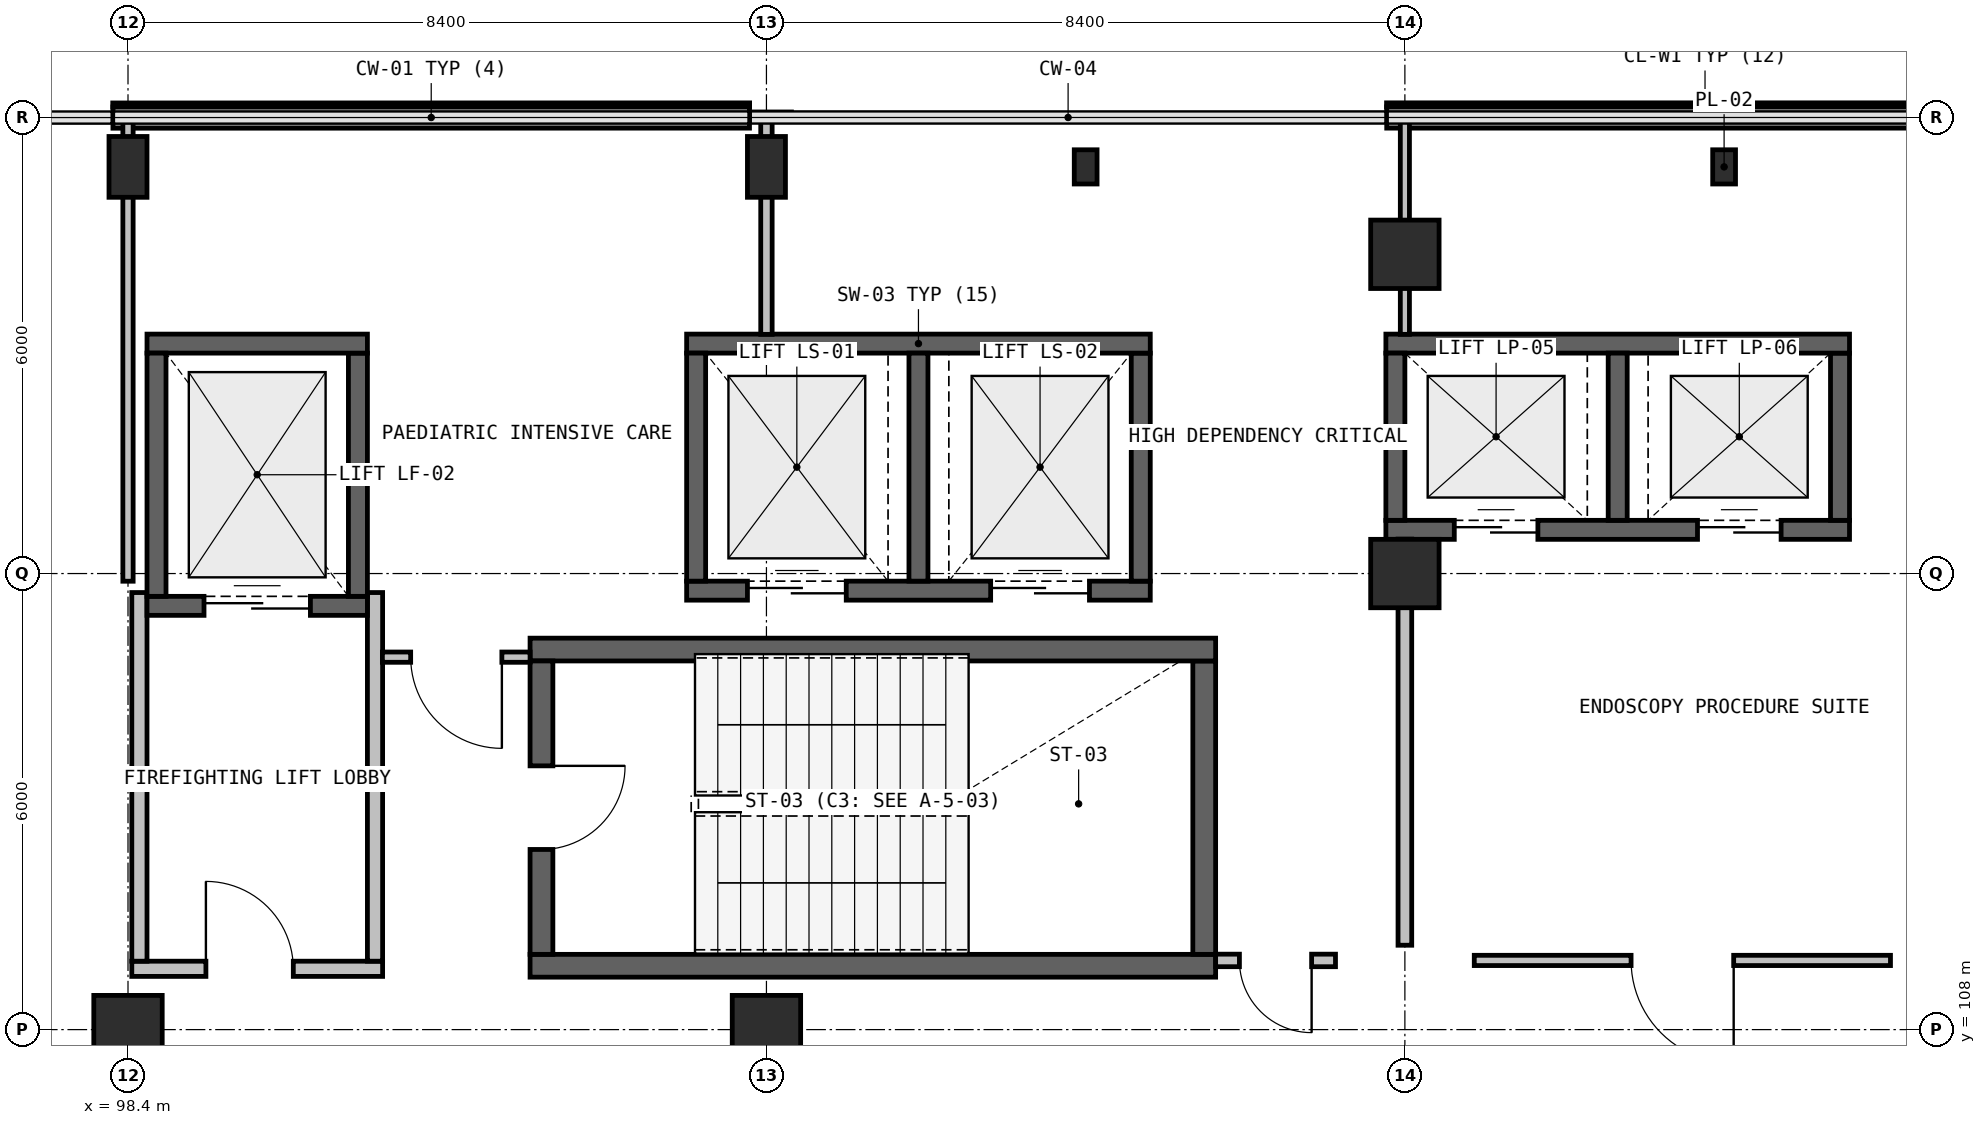
"""IFC4 building model, lengths in metres.
Left out: names, types, materials, properties, quantities, classifications, styles, units other than length and angle.
Written with IfcOpenShell. Run it as: python <this file> out.ifc"""

import sys

from ifc_helpers import new_model, si_unit, direction, frame, frame_2d, origin, origin_2d, place, context, subcontext, project, spatial, rectangle, extrude, element, fill, save


model = new_model("IFC4")
c1 = context("Model", 3, precision=1e-05, world=origin(), true_north=direction((0.0, 1.0)))
c2 = subcontext(c1, "Body", "Model", "MODEL_VIEW")
j1 = project(units=[si_unit("LENGTHUNIT", "METRE"), si_unit("PLANEANGLEUNIT", "RADIAN")], contexts=[c1])
p1 = place(None, origin())
s1 = spatial("IfcSite", under=j1, at=p1, CompositionType="ELEMENT")
p2 = place(p1, origin())
s2 = spatial("IfcBuilding", under=s1, at=p2, CompositionType="ELEMENT")
p3 = place(p2, frame((0.0, 0.0, 5.4)))
s3 = spatial("IfcBuildingStorey", under=s2, at=p3, CompositionType="ELEMENT", Elevation=5.4)
for number, where, z_axis, x_axis in (
    (1, (115.2, 118.2, 0.0), (0.0, 0.0, 1.0), (1.0, 0.0, 0.0)),
    (2, (98.4, 108.0, 0.0), (0.0, 0.0, 1.0), (1.0, 0.0, 0.0)),
):
    element("IfcColumn", number, at=place(p3, frame(where, z_axis=z_axis, x_axis=x_axis)), inside=s3, PredefinedType="COLUMN", context=c2, shape_type="SweptSolid", body=[
        extrude(rectangle(XDim=0.9, YDim=0.9, at=origin_2d()), origin(), (0.0, 0.0, 1.0), 4.8),
    ])
p4 = place(p3, frame((98.4, 119.35, 0.0), z_axis=(0.0, 0.0, 1.0), x_axis=(1.0, 0.0, 0.0)))
e3 = element("IfcColumn", 3, at=p4, inside=s3, PredefinedType="COLUMN", context=c2, shape_type="SweptSolid", body=[
    extrude(rectangle(XDim=0.5, YDim=0.8, at=origin_2d()), origin(), (0.0, 0.0, 1.0), 4.8),
])
p5 = place(p3, frame((106.8, 108.0, 0.0), z_axis=(0.0, 0.0, 1.0), x_axis=(1.0, 0.0, 0.0)))
e4 = element("IfcColumn", 4, at=p5, inside=s3, PredefinedType="COLUMN", context=c2, shape_type="SweptSolid", body=[
    extrude(rectangle(XDim=0.9, YDim=0.9, at=origin_2d()), origin(), (0.0, 0.0, 1.0), 4.8),
])
p6 = place(p3, frame((106.8, 119.35, 0.0), z_axis=(0.0, 0.0, 1.0), x_axis=(1.0, 0.0, 0.0)))
e5 = element("IfcColumn", 5, at=p6, inside=s3, PredefinedType="COLUMN", context=c2, shape_type="SweptSolid", body=[
    extrude(rectangle(XDim=0.5, YDim=0.8, at=origin_2d()), origin(), (0.0, 0.0, 1.0), 4.8),
])
p7 = place(p3, frame((115.2, 114.0, 0.0), z_axis=(0.0, 0.0, 1.0), x_axis=(1.0, 0.0, 0.0)))
e6 = element("IfcColumn", 6, at=p7, inside=s3, PredefinedType="COLUMN", context=c2, shape_type="SweptSolid", body=[
    extrude(rectangle(XDim=0.9, YDim=0.9, at=origin_2d()), origin(), (0.0, 0.0, 1.0), 4.8),
])
for number, where, z_axis, x_axis in (
    (7, (111.0, 119.35, 0.0), (0.0, 0.0, 1.0), (1.0, 0.0, 0.0)),
    (8, (119.4, 119.35, 0.0), (0.0, 0.0, 1.0), (1.0, 0.0, 0.0)),
):
    element("IfcColumn", number, at=place(p3, frame(where, z_axis=z_axis, x_axis=x_axis)), inside=s3, PredefinedType="PILASTER", context=c2, shape_type="SweptSolid", body=[
        extrude(rectangle(XDim=0.3, YDim=0.45, at=origin_2d()), origin(), (0.0, 0.0, 1.0), 4.445),
    ])
p8 = place(p3, frame((98.202, 119.999, 0.0), z_axis=(0.0, 0.0, 1.0), x_axis=(0.999999993202, 0.000116604477, 0.0)))
e9 = element("IfcWall", 9, at=p8, inside=s3, PredefinedType="SOLIDWALL", context=c2, shape_type="SweptSolid", body=[
    extrude(rectangle(XDim=8.375, YDim=0.28, at=frame_2d((4.188, 0.0))), origin(), (0.0, 0.0, 1.0), 0.94),
])
p9 = place(p3, frame((114.961, 120.0, 0.0), z_axis=(0.0, 0.0, 1.0), x_axis=(1.0, 0.0, 0.0)))
e10 = element("IfcWall", 10, at=p9, inside=s3, PredefinedType="SOLIDWALL", context=c2, shape_type="SweptSolid", body=[
    extrude(rectangle(XDim=8.376, YDim=0.28, at=frame_2d((4.188, 0.0))), origin(), (0.0, 0.0, 1.0), 0.94),
])
p10 = place(p3, frame((98.45, 108.8, 0.0), z_axis=(0.0, 0.0, 1.0), x_axis=(1.0, 0.0, 0.0)))
e11 = element("IfcWall", 11, at=p10, inside=s3, PredefinedType="SOLIDWALL", context=c2, shape_type="SweptSolid", body=[
    extrude(rectangle(XDim=3.3, YDim=0.2, at=frame_2d((1.65, 0.0))), origin(), (0.0, 0.0, 1.0), 4.445),
])
p11 = place(p10, frame((0.975, 0.0, 0.0)))
e12 = element("IfcOpeningElement", 12, at=p11, cuts=e11, PredefinedType="OPENING", context=c2, shape_type="SweptSolid", body=[
    extrude(rectangle(XDim=1.15, YDim=2.15, at=frame_2d((0.575, 1.075))), frame((0.0, 0.11, 0.0), z_axis=(0.0, -1.0, 0.0), x_axis=(1.0, 0.0, 0.0)), (0.0, 0.0, 1.0), 0.22),
])
p12 = place(p3, frame((101.65, 108.9, 0.0), z_axis=(0.0, 0.0, 1.0), x_axis=(0.0, 1.0, 0.0)))
e13 = element("IfcWall", 13, at=p12, inside=s3, PredefinedType="SOLIDWALL", context=c2, shape_type="SweptSolid", body=[
    extrude(rectangle(XDim=4.85, YDim=0.2, at=frame_2d((2.425, 0.0))), origin(), (0.0, 0.0, 1.0), 4.445),
])
p13 = place(p3, frame((98.55, 113.75, 0.0), z_axis=(0.0, 0.0, 1.0), x_axis=(0.0, -1.0, 0.0)))
e14 = element("IfcWall", 14, at=p13, inside=s3, PredefinedType="SOLIDWALL", context=c2, shape_type="SweptSolid", body=[
    extrude(rectangle(XDim=4.85, YDim=0.2, at=frame_2d((2.425, 0.0))), origin(), (0.0, 0.0, 1.0), 3.695),
])
p14 = place(p3, frame((103.69, 108.84, 0.0), z_axis=(0.0, 0.0, 1.0), x_axis=(1.0, 0.0, 0.0)))
e15 = element("IfcWall", 15, at=p14, inside=s3, PredefinedType="SHEAR", context=c2, shape_type="SweptSolid", body=[
    extrude(rectangle(XDim=9.02, YDim=0.3, at=frame_2d((4.51, 0.0))), origin(), (0.0, 0.0, 1.0), 4.445),
])
p15 = place(p3, frame((112.56, 108.99, 0.0), z_axis=(0.0, 0.0, 1.0), x_axis=(0.0, 1.0, 0.0)))
e16 = element("IfcWall", 16, at=p15, inside=s3, PredefinedType="SHEAR", context=c2, shape_type="SweptSolid", body=[
    extrude(rectangle(XDim=3.86, YDim=0.3, at=frame_2d((1.93, 0.0))), origin(), (0.0, 0.0, 1.0), 4.445),
])
p16 = place(p3, frame((112.71, 113.0, 0.0), z_axis=(0.0, 0.0, 1.0), x_axis=(-1.0, 0.0, 0.0)))
e17 = element("IfcWall", 17, at=p16, inside=s3, PredefinedType="SHEAR", context=c2, shape_type="SweptSolid", body=[
    extrude(rectangle(XDim=9.02, YDim=0.3, at=frame_2d((4.51, 0.0))), origin(), (0.0, 0.0, 1.0), 4.445),
])
p17 = place(p3, frame((103.84, 112.85, 0.0), z_axis=(0.0, 0.0, 1.0), x_axis=(0.0, -1.0, 0.0)))
e18 = element("IfcWall", 18, at=p17, inside=s3, PredefinedType="SHEAR", context=c2, shape_type="SweptSolid", body=[
    extrude(rectangle(XDim=3.86, YDim=0.3, at=frame_2d((1.93, 0.0))), origin(), (0.0, 0.0, 1.0), 4.445),
])
p18 = place(p17, frame((1.38, 0.0, 0.0)))
e19 = element("IfcOpeningElement", 19, at=p18, cuts=e18, PredefinedType="OPENING", context=c2, shape_type="SweptSolid", body=[
    extrude(rectangle(XDim=1.1, YDim=2.15, at=frame_2d((0.55, 1.075))), frame((0.0, 0.16, 0.0), z_axis=(0.0, -1.0, 0.0), x_axis=(1.0, 0.0, 0.0)), (0.0, 0.0, 1.0), 0.32),
])
p19 = place(p3, frame((98.65, 113.575, 0.0), z_axis=(0.0, 0.0, 1.0), x_axis=(1.0, 0.0, 0.0)))
e20 = element("IfcWall", 20, at=p19, inside=s3, PredefinedType="SHEAR", context=c2, shape_type="SweptSolid", body=[
    extrude(rectangle(XDim=2.9, YDim=0.25, at=frame_2d((1.45, 0.0))), origin(), (0.0, 0.0, 1.0), 4.445),
])
p20 = place(p19, frame((0.75, 0.0, 0.0)))
e21 = element("IfcOpeningElement", 21, at=p20, cuts=e20, PredefinedType="OPENING", context=c2, shape_type="SweptSolid", body=[
    extrude(rectangle(XDim=1.4, YDim=2.15, at=frame_2d((0.7, 1.075))), frame((0.0, 0.135, 0.0), z_axis=(0.0, -1.0, 0.0), x_axis=(1.0, 0.0, 0.0)), (0.0, 0.0, 1.0), 0.27),
])
p21 = place(p3, frame((101.425, 113.7, 0.0), z_axis=(0.0, 0.0, 1.0), x_axis=(0.0, 1.0, 0.0)))
e22 = element("IfcWall", 22, at=p21, inside=s3, PredefinedType="SHEAR", context=c2, shape_type="SweptSolid", body=[
    extrude(rectangle(XDim=3.2, YDim=0.25, at=frame_2d((1.6, 0.0))), origin(), (0.0, 0.0, 1.0), 4.445),
])
p22 = place(p3, frame((101.55, 117.025, 0.0), z_axis=(0.0, 0.0, 1.0), x_axis=(-1.0, 0.0, 0.0)))
e23 = element("IfcWall", 23, at=p22, inside=s3, PredefinedType="SHEAR", context=c2, shape_type="SweptSolid", body=[
    extrude(rectangle(XDim=2.9, YDim=0.25, at=frame_2d((1.45, 0.0))), origin(), (0.0, 0.0, 1.0), 4.445),
])
p23 = place(p3, frame((98.775, 116.9, 0.0), z_axis=(0.0, 0.0, 1.0), x_axis=(0.0, -1.0, 0.0)))
e24 = element("IfcWall", 24, at=p23, inside=s3, PredefinedType="SHEAR", context=c2, shape_type="SweptSolid", body=[
    extrude(rectangle(XDim=3.2, YDim=0.25, at=frame_2d((1.6, 0.0))), origin(), (0.0, 0.0, 1.0), 4.445),
])
p24 = place(p3, frame((105.75, 113.775, 0.0), z_axis=(0.0, 0.0, 1.0), x_axis=(1.0, 0.0, 0.0)))
e25 = element("IfcWall", 25, at=p24, inside=s3, PredefinedType="SHEAR", context=c2, shape_type="SweptSolid", body=[
    extrude(rectangle(XDim=6.1, YDim=0.25, at=frame_2d((3.05, 0.0))), origin(), (0.0, 0.0, 1.0), 4.445),
])
p25 = place(p24, frame((0.8, 0.0, 0.0)))
e26 = element("IfcOpeningElement", 26, at=p25, cuts=e25, PredefinedType="OPENING", context=c2, shape_type="SweptSolid", body=[
    extrude(rectangle(XDim=1.3, YDim=2.15, at=frame_2d((0.65, 1.075))), frame((0.0, 0.135, 0.0), z_axis=(0.0, -1.0, 0.0), x_axis=(1.0, 0.0, 0.0)), (0.0, 0.0, 1.0), 0.27),
])
p26 = place(p24, frame((4.0, 0.0, 0.0)))
e27 = element("IfcOpeningElement", 27, at=p26, cuts=e25, PredefinedType="OPENING", context=c2, shape_type="SweptSolid", body=[
    extrude(rectangle(XDim=1.3, YDim=2.15, at=frame_2d((0.65, 1.075))), frame((0.0, 0.135, 0.0), z_axis=(0.0, -1.0, 0.0), x_axis=(1.0, 0.0, 0.0)), (0.0, 0.0, 1.0), 0.27),
])
p27 = place(p3, frame((111.725, 113.9, 0.0), z_axis=(0.0, 0.0, 1.0), x_axis=(0.0, 1.0, 0.0)))
e28 = element("IfcWall", 28, at=p27, inside=s3, PredefinedType="SHEAR", context=c2, shape_type="SweptSolid", body=[
    extrude(rectangle(XDim=3.0, YDim=0.25, at=frame_2d((1.5, 0.0))), origin(), (0.0, 0.0, 1.0), 4.445),
])
p28 = place(p3, frame((111.85, 117.025, 0.0), z_axis=(0.0, 0.0, 1.0), x_axis=(-1.0, 0.0, 0.0)))
e29 = element("IfcWall", 29, at=p28, inside=s3, PredefinedType="SHEAR", context=c2, shape_type="SweptSolid", body=[
    extrude(rectangle(XDim=6.1, YDim=0.25, at=frame_2d((3.05, 0.0))), origin(), (0.0, 0.0, 1.0), 4.445),
])
for number, where, z_axis, x_axis in (
    (30, (105.875, 116.9, 0.0), (0.0, 0.0, 1.0), (0.0, -1.0, 0.0)),
    (31, (108.8, 113.9, 0.0), (0.0, 0.0, 1.0), (0.0, 1.0, 0.0)),
):
    element("IfcWall", number, at=place(p3, frame(where, z_axis=z_axis, x_axis=x_axis)), inside=s3, PredefinedType="SHEAR", context=c2, shape_type="SweptSolid", body=[
        extrude(rectangle(XDim=3.0, YDim=0.25, at=frame_2d((1.5, 0.0))), origin(), (0.0, 0.0, 1.0), 4.445),
    ])
p29 = place(p3, frame((114.95, 114.575, 0.0), z_axis=(0.0, 0.0, 1.0), x_axis=(1.0, 0.0, 0.0)))
e32 = element("IfcWall", 32, at=p29, inside=s3, PredefinedType="SHEAR", context=c2, shape_type="SweptSolid", body=[
    extrude(rectangle(XDim=6.1, YDim=0.25, at=frame_2d((3.05, 0.0))), origin(), (0.0, 0.0, 1.0), 4.445),
])
p30 = place(p29, frame((0.9, 0.0, 0.0)))
e33 = element("IfcOpeningElement", 33, at=p30, cuts=e32, PredefinedType="OPENING", context=c2, shape_type="SweptSolid", body=[
    extrude(rectangle(XDim=1.1, YDim=2.15, at=frame_2d((0.55, 1.075))), frame((0.0, 0.135, 0.0), z_axis=(0.0, -1.0, 0.0), x_axis=(1.0, 0.0, 0.0)), (0.0, 0.0, 1.0), 0.27),
])
p31 = place(p29, frame((4.1, 0.0, 0.0)))
e34 = element("IfcOpeningElement", 34, at=p31, cuts=e32, PredefinedType="OPENING", context=c2, shape_type="SweptSolid", body=[
    extrude(rectangle(XDim=1.1, YDim=2.15, at=frame_2d((0.55, 1.075))), frame((0.0, 0.135, 0.0), z_axis=(0.0, -1.0, 0.0), x_axis=(1.0, 0.0, 0.0)), (0.0, 0.0, 1.0), 0.27),
])
p32 = place(p3, frame((120.925, 114.7, 0.0), z_axis=(0.0, 0.0, 1.0), x_axis=(0.0, 1.0, 0.0)))
e35 = element("IfcWall", 35, at=p32, inside=s3, PredefinedType="SHEAR", context=c2, shape_type="SweptSolid", body=[
    extrude(rectangle(XDim=2.2, YDim=0.25, at=frame_2d((1.1, 0.0))), origin(), (0.0, 0.0, 1.0), 4.445),
])
p33 = place(p3, frame((121.05, 117.025, 0.0), z_axis=(0.0, 0.0, 1.0), x_axis=(-1.0, 0.0, 0.0)))
e36 = element("IfcWall", 36, at=p33, inside=s3, PredefinedType="SHEAR", context=c2, shape_type="SweptSolid", body=[
    extrude(rectangle(XDim=6.1, YDim=0.25, at=frame_2d((3.05, 0.0))), origin(), (0.0, 0.0, 1.0), 4.445),
])
for number, where, z_axis, x_axis in (
    (37, (115.075, 116.9, 0.0), (0.0, 0.0, 1.0), (0.0, -1.0, 0.0)),
    (38, (118.0, 114.7, 0.0), (0.0, 0.0, 1.0), (0.0, 1.0, 0.0)),
):
    element("IfcWall", number, at=place(p3, frame(where, z_axis=z_axis, x_axis=x_axis)), inside=s3, PredefinedType="SHEAR", context=c2, shape_type="SweptSolid", body=[
        extrude(rectangle(XDim=2.2, YDim=0.25, at=frame_2d((1.1, 0.0))), origin(), (0.0, 0.0, 1.0), 4.445),
    ])
p34 = place(p3, frame((98.4, 119.957, 0.0), z_axis=(0.0, 0.0, 1.0), x_axis=(0.0, -1.0, 0.0)))
e39 = element("IfcWall", 39, at=p34, inside=s3, PredefinedType="PARTITIONING", context=c2, shape_type="SweptSolid", body=[
    extrude(rectangle(XDim=6.058, YDim=0.135, at=frame_2d((3.029, 0.0))), origin(), (0.0, 0.0, 1.0), 3.695),
])
p35 = place(p3, frame((106.8, 119.989, 0.0), z_axis=(0.0, 0.0, 1.0), x_axis=(0.0, -1.0, 0.0)))
e40 = element("IfcWall", 40, at=p35, inside=s3, PredefinedType="PARTITIONING", context=c2, shape_type="SweptSolid", body=[
    extrude(rectangle(XDim=2.842, YDim=0.15, at=frame_2d((1.421, 0.0))), origin(), (0.0, 0.0, 1.0), 4.445),
])
p36 = place(p3, frame((103.69, 112.9, 0.0), z_axis=(0.0, 0.0, 1.0), x_axis=(-1.0, 0.0, 0.0)))
e41 = element("IfcWall", 41, at=p36, inside=s3, PredefinedType="PARTITIONING", context=c2, shape_type="SweptSolid", body=[
    extrude(rectangle(XDim=1.943, YDim=0.135, at=frame_2d((0.971, 0.0))), origin(), (0.0, 0.0, 1.0), 4.445),
])
p37 = place(p36, frame((0.371, 0.0, 0.0)))
e42 = element("IfcOpeningElement", 42, at=p37, cuts=e41, PredefinedType="OPENING", context=c2, shape_type="SweptSolid", body=[
    extrude(rectangle(XDim=1.2, YDim=2.15, at=frame_2d((0.6, 1.075))), frame((0.0, 0.077, 0.0), z_axis=(0.0, -1.0, 0.0), x_axis=(1.0, 0.0, 0.0)), (0.0, 0.0, 1.0), 0.155),
])
p38 = place(p3, frame((115.2, 119.958, 0.0), z_axis=(0.0, 0.0, 1.0), x_axis=(0.0, -1.0, 0.0)))
e43 = element("IfcWall", 43, at=p38, inside=s3, PredefinedType="PARTITIONING", context=c2, shape_type="SweptSolid", body=[
    extrude(rectangle(XDim=2.811, YDim=0.12, at=frame_2d((1.406, 0.0))), origin(), (0.0, 0.0, 1.0), 4.445),
])
p39 = place(p3, frame((115.2, 114.453, 0.0), z_axis=(0.0, 0.0, 1.0), x_axis=(0.0, -1.0, 0.0)))
e44 = element("IfcWall", 44, at=p39, inside=s3, PredefinedType="PARTITIONING", context=c2, shape_type="SweptSolid", body=[
    extrude(rectangle(XDim=5.343, YDim=0.18, at=frame_2d((2.671, 0.0))), origin(), (0.0, 0.0, 1.0), 3.695),
])
p40 = place(p3, frame((114.287, 108.91, 0.0), z_axis=(0.0, 0.0, 1.0), x_axis=(-1.0, 0.0, 0.0)))
e45 = element("IfcWall", 45, at=p40, inside=s3, PredefinedType="PARTITIONING", context=c2, shape_type="SweptSolid", body=[
    extrude(rectangle(XDim=1.577, YDim=0.165, at=frame_2d((0.789, 0.0))), origin(), (0.0, 0.0, 1.0), 4.445),
])
p41 = place(p40, frame((0.314, 0.0, 0.0)))
e46 = element("IfcOpeningElement", 46, at=p41, cuts=e45, PredefinedType="OPENING", context=c2, shape_type="SweptSolid", body=[
    extrude(rectangle(XDim=0.95, YDim=2.1, at=frame_2d((0.475, 1.05))), frame((0.0, 0.093, 0.0), z_axis=(0.0, -1.0, 0.0), x_axis=(1.0, 0.0, 0.0)), (0.0, 0.0, 1.0), 0.185),
])
p42 = place(p3, frame((121.589, 108.91, 0.0), z_axis=(0.0, 0.0, 1.0), x_axis=(-1.0, 0.0, 0.0)))
e47 = element("IfcWall", 47, at=p42, inside=s3, PredefinedType="PARTITIONING", context=c2, shape_type="SweptSolid", body=[
    extrude(rectangle(XDim=5.476, YDim=0.135, at=frame_2d((2.738, 0.0))), origin(), (0.0, 0.0, 1.0), 4.445),
])
p43 = place(p42, frame((2.063, 0.0, 0.0)))
e48 = element("IfcOpeningElement", 48, at=p43, cuts=e47, PredefinedType="OPENING", context=c2, shape_type="SweptSolid", body=[
    extrude(rectangle(XDim=1.35, YDim=2.15, at=frame_2d((0.675, 1.075))), frame((0.0, 0.077, 0.0), z_axis=(0.0, -1.0, 0.0), x_axis=(1.0, 0.0, 0.0)), (0.0, 0.0, 1.0), 0.155),
])
p44 = place(p11, origin())
e49 = element("IfcDoor", 49, at=p44, inside=s3, OperationType="SINGLE_SWING_LEFT", PredefinedType="DOOR", context=c2, shape_type="SweptSolid", body=[
    extrude(rectangle(XDim=1.15, YDim=2.15, at=frame_2d((0.575, 1.075))), frame((0.0, 0.025, 0.0), z_axis=(0.0, -1.0, 0.0), x_axis=(1.0, 0.0, 0.0)), (0.0, 0.0, 1.0), 0.05),
])
fill(e12, e49)
p45 = place(p18, origin())
e50 = element("IfcDoor", 50, at=p45, inside=s3, OperationType="SINGLE_SWING_LEFT", PredefinedType="DOOR", context=c2, shape_type="SweptSolid", body=[
    extrude(rectangle(XDim=1.1, YDim=2.15, at=frame_2d((0.55, 1.075))), frame((0.0, 0.025, 0.0), z_axis=(0.0, -1.0, 0.0), x_axis=(1.0, 0.0, 0.0)), (0.0, 0.0, 1.0), 0.05),
])
fill(e19, e50)
p46 = place(p20, origin())
e51 = element("IfcDoor", 51, at=p46, inside=s3, OperationType="DOUBLE_DOOR_SLIDING", PredefinedType="DOOR", context=c2, shape_type="SweptSolid", body=[
    extrude(rectangle(XDim=1.4, YDim=2.15, at=frame_2d((0.7, 1.075))), frame((0.0, 0.025, 0.0), z_axis=(0.0, -1.0, 0.0), x_axis=(1.0, 0.0, 0.0)), (0.0, 0.0, 1.0), 0.05),
])
fill(e21, e51)
p47 = place(p25, origin())
e52 = element("IfcDoor", 52, at=p47, inside=s3, OperationType="DOUBLE_DOOR_SLIDING", PredefinedType="DOOR", context=c2, shape_type="SweptSolid", body=[
    extrude(rectangle(XDim=1.3, YDim=2.15, at=frame_2d((0.65, 1.075))), frame((0.0, 0.025, 0.0), z_axis=(0.0, -1.0, 0.0), x_axis=(1.0, 0.0, 0.0)), (0.0, 0.0, 1.0), 0.05),
])
fill(e26, e52)
p48 = place(p26, origin())
e53 = element("IfcDoor", 53, at=p48, inside=s3, OperationType="DOUBLE_DOOR_SLIDING", PredefinedType="DOOR", context=c2, shape_type="SweptSolid", body=[
    extrude(rectangle(XDim=1.3, YDim=2.15, at=frame_2d((0.65, 1.075))), frame((0.0, 0.025, 0.0), z_axis=(0.0, -1.0, 0.0), x_axis=(1.0, 0.0, 0.0)), (0.0, 0.0, 1.0), 0.05),
])
fill(e27, e53)
p49 = place(p30, origin())
e54 = element("IfcDoor", 54, at=p49, inside=s3, OperationType="DOUBLE_DOOR_SLIDING", PredefinedType="DOOR", context=c2, shape_type="SweptSolid", body=[
    extrude(rectangle(XDim=1.1, YDim=2.15, at=frame_2d((0.55, 1.075))), frame((0.0, 0.025, 0.0), z_axis=(0.0, -1.0, 0.0), x_axis=(1.0, 0.0, 0.0)), (0.0, 0.0, 1.0), 0.05),
])
fill(e33, e54)
p50 = place(p31, origin())
e55 = element("IfcDoor", 55, at=p50, inside=s3, OperationType="DOUBLE_DOOR_SLIDING", PredefinedType="DOOR", context=c2, shape_type="SweptSolid", body=[
    extrude(rectangle(XDim=1.1, YDim=2.15, at=frame_2d((0.55, 1.075))), frame((0.0, 0.025, 0.0), z_axis=(0.0, -1.0, 0.0), x_axis=(1.0, 0.0, 0.0)), (0.0, 0.0, 1.0), 0.05),
])
fill(e34, e55)
p51 = place(p37, origin())
e56 = element("IfcDoor", 56, at=p51, inside=s3, OperationType="SINGLE_SWING_LEFT", PredefinedType="DOOR", context=c2, shape_type="SweptSolid", body=[
    extrude(rectangle(XDim=1.2, YDim=2.15, at=frame_2d((0.6, 1.075))), frame((0.0, 0.025, 0.0), z_axis=(0.0, -1.0, 0.0), x_axis=(1.0, 0.0, 0.0)), (0.0, 0.0, 1.0), 0.05),
])
fill(e42, e56)
p52 = place(p41, origin())
e57 = element("IfcDoor", 57, at=p52, inside=s3, OperationType="SINGLE_SWING_RIGHT", PredefinedType="DOOR", context=c2, shape_type="SweptSolid", body=[
    extrude(rectangle(XDim=0.95, YDim=2.1, at=frame_2d((0.475, 1.05))), frame((0.0, 0.025, 0.0), z_axis=(0.0, -1.0, 0.0), x_axis=(1.0, 0.0, 0.0)), (0.0, 0.0, 1.0), 0.05),
])
fill(e46, e57)
p53 = place(p43, origin())
e58 = element("IfcDoor", 58, at=p53, inside=s3, OperationType="SINGLE_SWING_LEFT", PredefinedType="DOOR", context=c2, shape_type="SweptSolid", body=[
    extrude(rectangle(XDim=1.35, YDim=2.15, at=frame_2d((0.675, 1.075))), frame((0.0, 0.025, 0.0), z_axis=(0.0, -1.0, 0.0), x_axis=(1.0, 0.0, 0.0)), (0.0, 0.0, 1.0), 0.05),
])
fill(e48, e58)
save(model, sys.argv[1])
